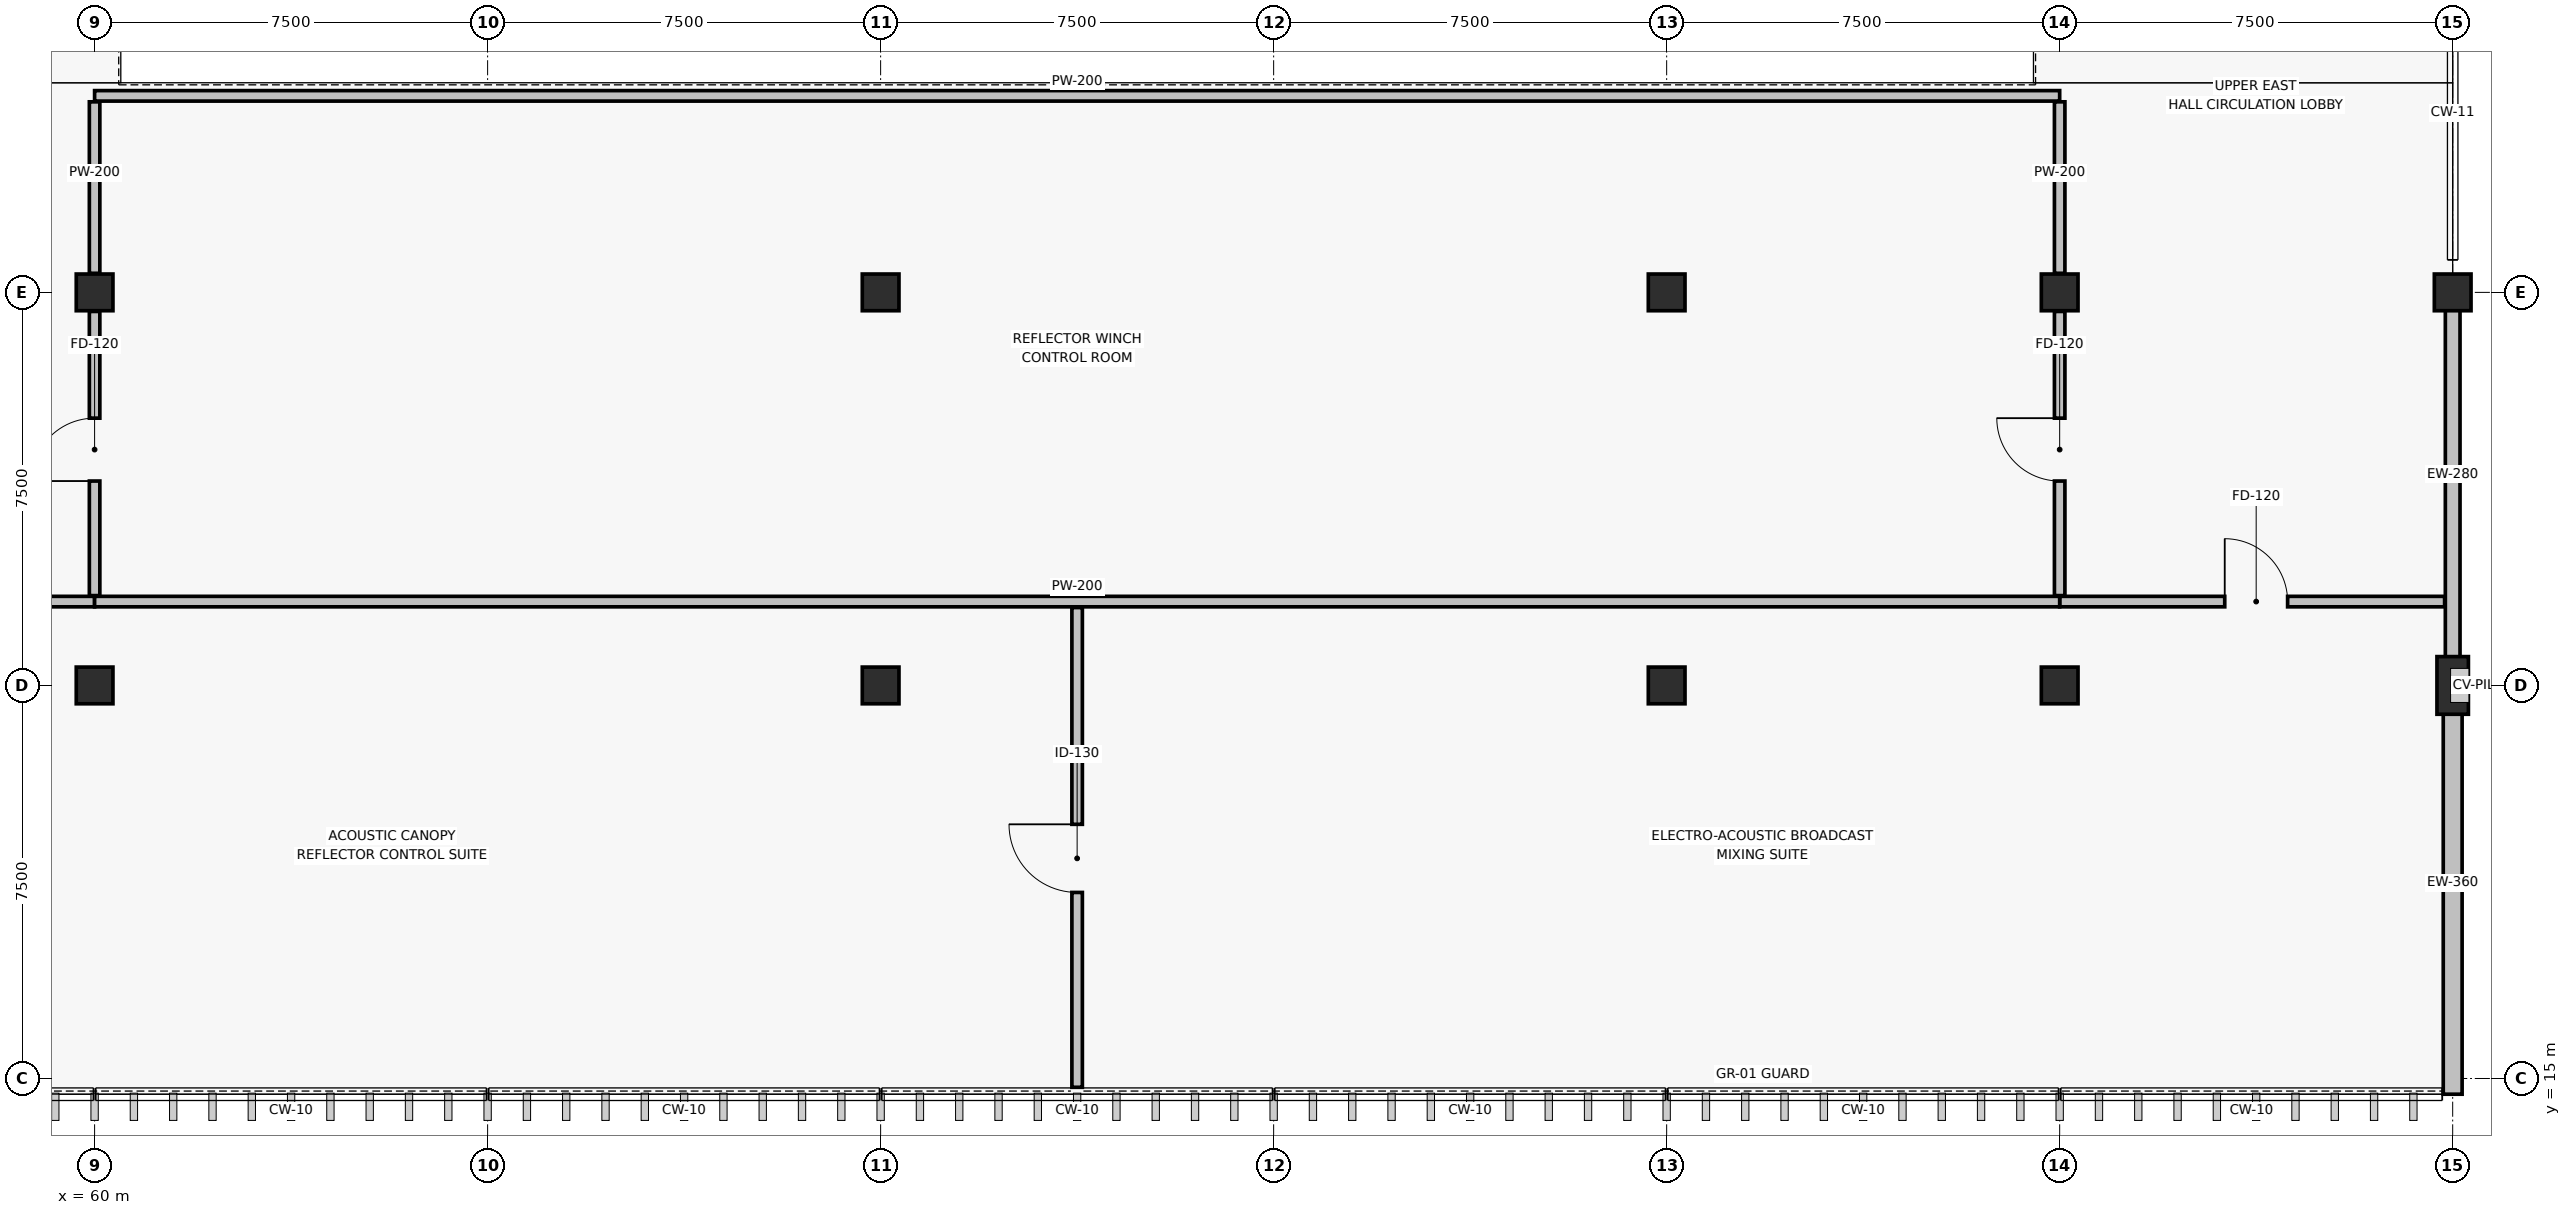
"""IFC4 building model, lengths in metres.
Left out: names, types, materials, properties, quantities, classifications, styles, units other than length and angle.
Written with IfcOpenShell. Run it as: python <this file> out.ifc"""

import sys

from ifc_helpers import new_model, si_unit, direction, frame, frame_2d, origin, origin_2d, place, context, subcontext, project, spatial, rectangle, extrude, element, fill, save


model = new_model("IFC4")
c1 = context("Model", 3, precision=1e-05, world=origin(), true_north=direction((0.0, 1.0)))
c2 = subcontext(c1, "Body", "Model", "MODEL_VIEW")
j1 = project(units=[si_unit("LENGTHUNIT", "METRE"), si_unit("PLANEANGLEUNIT", "RADIAN")], contexts=[c1])
p1 = place(None, origin())
s1 = spatial("IfcSite", under=j1, at=p1, CompositionType="ELEMENT")
p2 = place(p1, origin())
s2 = spatial("IfcBuilding", under=s1, at=p2, CompositionType="ELEMENT")
p3 = place(p2, frame((0.0, 0.0, 17.1)))
s3 = spatial("IfcBuildingStorey", under=s2, at=p3, CompositionType="ELEMENT", Elevation=17.1)
for number, where, z_axis, x_axis in (
    (1, (60.0, 22.5, 0.0), (0.0, 0.0, 1.0), (1.0, 0.0, 0.0)),
    (2, (60.0, 30.0, 0.0), (0.0, 0.0, 1.0), (1.0, 0.0, 0.0)),
    (3, (75.0, 22.5, 0.0), (0.0, 0.0, 1.0), (1.0, 0.0, 0.0)),
    (4, (75.0, 30.0, 0.0), (0.0, 0.0, 1.0), (1.0, 0.0, 0.0)),
    (5, (90.0, 22.5, 0.0), (0.0, 0.0, 1.0), (1.0, 0.0, 0.0)),
    (6, (90.0, 30.0, 0.0), (0.0, 0.0, 1.0), (1.0, 0.0, 0.0)),
    (7, (97.5, 22.5, 0.0), (0.0, 0.0, 1.0), (1.0, 0.0, 0.0)),
    (8, (97.5, 30.0, 0.0), (0.0, 0.0, 1.0), (1.0, 0.0, 0.0)),
):
    element("IfcColumn", number, at=place(p3, frame(where, z_axis=z_axis, x_axis=x_axis)), inside=s3, PredefinedType="COLUMN", context=c2, shape_type="SweptSolid", body=[
        extrude(rectangle(XDim=0.7, YDim=0.7, at=origin_2d()), origin(), (0.0, 0.0, 1.0), 3.9),
    ])
p4 = place(p3, frame((105.0, 22.5, 0.0), z_axis=(0.0, 0.0, 1.0), x_axis=(1.0, 0.0, 0.0)))
e9 = element("IfcColumn", 9, at=p4, inside=s3, PredefinedType="COLUMN", context=c2, shape_type="SweptSolid", body=[
    extrude(rectangle(XDim=0.6, YDim=1.1, at=origin_2d()), origin(), (0.0, 0.0, 1.0), 3.9),
])
p5 = place(p3, frame((105.0, 30.0, 0.0), z_axis=(0.0, 0.0, 1.0), x_axis=(1.0, 0.0, 0.0)))
e10 = element("IfcColumn", 10, at=p5, inside=s3, PredefinedType="COLUMN", context=c2, shape_type="SweptSolid", body=[
    extrude(rectangle(XDim=0.7, YDim=0.7, at=origin_2d()), origin(), (0.0, 0.0, 1.0), 3.9),
])
p6 = place(p3, frame((105.0, 14.7, 0.0), z_axis=(0.0, 0.0, 1.0), x_axis=(0.0, 1.0, 0.0)))
e11 = element("IfcWall", 11, at=p6, inside=s3, PredefinedType="SOLIDWALL", context=c2, shape_type="SweptSolid", body=[
    extrude(rectangle(XDim=7.5, YDim=0.36, at=frame_2d((3.75, 0.0))), origin(), (0.0, 0.0, 1.0), 2.39),
])
p7 = place(p3, frame((105.0, 22.8, 0.0), z_axis=(0.0, 0.0, 1.0), x_axis=(0.0, 1.0, 0.0)))
e12 = element("IfcWall", 12, at=p7, inside=s3, PredefinedType="SOLIDWALL", context=c2, shape_type="SweptSolid", body=[
    extrude(rectangle(XDim=6.9, YDim=0.28, at=frame_2d((3.45, 0.0))), origin(), (0.0, 0.0, 1.0), 2.39),
])
p8 = place(p3, frame((52.654, 24.1, 0.0), z_axis=(0.0, 0.0, 1.0), x_axis=(1.0, 0.0, 0.0)))
e13 = element("IfcWall", 13, at=p8, inside=s3, PredefinedType="PARTITIONING", context=c2, shape_type="SweptSolid", body=[
    extrude(rectangle(XDim=7.346, YDim=0.2, at=frame_2d((3.673, 0.0))), origin(), (0.0, 0.0, 1.0), 2.39),
])
p9 = place(p8, frame((2.996, 0.0, 0.0)))
e14 = element("IfcOpeningElement", 14, at=p9, cuts=e13, PredefinedType="OPENING", context=c2, shape_type="SweptSolid", body=[
    extrude(rectangle(XDim=1.2, YDim=2.15, at=frame_2d((0.6, 1.075))), frame((0.0, 0.11, 0.0), z_axis=(0.0, -1.0, 0.0), x_axis=(1.0, 0.0, 0.0)), (0.0, 0.0, 1.0), 0.22),
])
p10 = place(p3, frame((97.5, 24.1, 0.0), z_axis=(0.0, 0.0, 1.0), x_axis=(1.0, 0.0, 0.0)))
e15 = element("IfcWall", 15, at=p10, inside=s3, PredefinedType="PARTITIONING", context=c2, shape_type="SweptSolid", body=[
    extrude(rectangle(XDim=7.346, YDim=0.2, at=frame_2d((3.673, 0.0))), origin(), (0.0, 0.0, 1.0), 2.39),
])
p11 = place(p10, frame((3.15, 0.0, 0.0)))
e16 = element("IfcOpeningElement", 16, at=p11, cuts=e15, PredefinedType="OPENING", context=c2, shape_type="SweptSolid", body=[
    extrude(rectangle(XDim=1.2, YDim=2.15, at=frame_2d((0.6, 1.075))), frame((0.0, 0.11, 0.0), z_axis=(0.0, -1.0, 0.0), x_axis=(1.0, 0.0, 0.0)), (0.0, 0.0, 1.0), 0.22),
])
for number, where, z_axis, x_axis in (
    (17, (60.0, 24.1, 0.0), (0.0, 0.0, 1.0), (1.0, 0.0, 0.0)),
    (18, (60.0, 33.75, 0.0), (0.0, 0.0, 1.0), (1.0, 0.0, 0.0)),
):
    element("IfcWall", number, at=place(p3, frame(where, z_axis=z_axis, x_axis=x_axis)), inside=s3, PredefinedType="PARTITIONING", context=c2, shape_type="SweptSolid", body=[
        extrude(rectangle(XDim=37.5, YDim=0.2, at=frame_2d((18.75, 0.0))), origin(), (0.0, 0.0, 1.0), 2.39),
    ])
p12 = place(p3, frame((78.75, 14.832, 0.0), z_axis=(0.0, 0.0, 1.0), x_axis=(0.0, 1.0, 0.0)))
e19 = element("IfcWall", 19, at=p12, inside=s3, PredefinedType="PARTITIONING", context=c2, shape_type="SweptSolid", body=[
    extrude(rectangle(XDim=9.154, YDim=0.2, at=frame_2d((4.577, 0.0))), origin(), (0.0, 0.0, 1.0), 2.59),
])
p13 = place(p12, frame((3.718, 0.0, 0.0)))
e20 = element("IfcOpeningElement", 20, at=p13, cuts=e19, PredefinedType="OPENING", context=c2, shape_type="SweptSolid", body=[
    extrude(rectangle(XDim=1.3, YDim=2.15, at=frame_2d((0.65, 1.075))), frame((0.0, 0.11, 0.0), z_axis=(0.0, -1.0, 0.0), x_axis=(1.0, 0.0, 0.0)), (0.0, 0.0, 1.0), 0.22),
])
p14 = place(p3, frame((60.0, 24.214, 0.0), z_axis=(0.0, 0.0, 1.0), x_axis=(0.0, 1.0, 0.0)))
e21 = element("IfcWall", 21, at=p14, inside=s3, PredefinedType="PARTITIONING", context=c2, shape_type="SweptSolid", body=[
    extrude(rectangle(XDim=5.422, YDim=0.2, at=frame_2d((2.711, 0.0))), origin(), (0.0, 0.0, 1.0), 2.39),
])
p15 = place(p14, frame((2.186, 0.0, 0.0)))
e22 = element("IfcOpeningElement", 22, at=p15, cuts=e21, PredefinedType="OPENING", context=c2, shape_type="SweptSolid", body=[
    extrude(rectangle(XDim=1.2, YDim=2.15, at=frame_2d((0.6, 1.075))), frame((0.0, 0.11, 0.0), z_axis=(0.0, -1.0, 0.0), x_axis=(1.0, 0.0, 0.0)), (0.0, 0.0, 1.0), 0.22),
])
p16 = place(p3, frame((60.0, 30.364, 0.0), z_axis=(0.0, 0.0, 1.0), x_axis=(0.0, 1.0, 0.0)))
e23 = element("IfcWall", 23, at=p16, inside=s3, PredefinedType="PARTITIONING", context=c2, shape_type="SweptSolid", body=[
    extrude(rectangle(XDim=3.272, YDim=0.2, at=frame_2d((1.636, 0.0))), origin(), (0.0, 0.0, 1.0), 2.39),
])
p17 = place(p3, frame((97.5, 24.214, 0.0), z_axis=(0.0, 0.0, 1.0), x_axis=(0.0, 1.0, 0.0)))
e24 = element("IfcWall", 24, at=p17, inside=s3, PredefinedType="PARTITIONING", context=c2, shape_type="SweptSolid", body=[
    extrude(rectangle(XDim=5.422, YDim=0.2, at=frame_2d((2.711, 0.0))), origin(), (0.0, 0.0, 1.0), 2.39),
])
p18 = place(p17, frame((2.186, 0.0, 0.0)))
e25 = element("IfcOpeningElement", 25, at=p18, cuts=e24, PredefinedType="OPENING", context=c2, shape_type="SweptSolid", body=[
    extrude(rectangle(XDim=1.2, YDim=2.15, at=frame_2d((0.6, 1.075))), frame((0.0, 0.11, 0.0), z_axis=(0.0, -1.0, 0.0), x_axis=(1.0, 0.0, 0.0)), (0.0, 0.0, 1.0), 0.22),
])
p19 = place(p3, frame((97.5, 30.364, 0.0), z_axis=(0.0, 0.0, 1.0), x_axis=(0.0, 1.0, 0.0)))
e26 = element("IfcWall", 26, at=p19, inside=s3, PredefinedType="PARTITIONING", context=c2, shape_type="SweptSolid", body=[
    extrude(rectangle(XDim=3.272, YDim=0.2, at=frame_2d((1.636, 0.0))), origin(), (0.0, 0.0, 1.0), 2.39),
])
p20 = place(p11, origin())
e27 = element("IfcDoor", 27, at=p20, inside=s3, OperationType="SINGLE_SWING_LEFT", PredefinedType="DOOR", context=c2, shape_type="SweptSolid", body=[
    extrude(rectangle(XDim=1.2, YDim=2.15, at=frame_2d((0.6, 1.075))), frame((0.0, 0.025, 0.0), z_axis=(0.0, -1.0, 0.0), x_axis=(1.0, 0.0, 0.0)), (0.0, 0.0, 1.0), 0.05),
])
fill(e16, e27)
p21 = place(p13, origin())
e28 = element("IfcDoor", 28, at=p21, inside=s3, OperationType="SINGLE_SWING_RIGHT", PredefinedType="DOOR", context=c2, shape_type="SweptSolid", body=[
    extrude(rectangle(XDim=1.3, YDim=2.15, at=frame_2d((0.65, 1.075))), frame((0.0, 0.025, 0.0), z_axis=(0.0, -1.0, 0.0), x_axis=(1.0, 0.0, 0.0)), (0.0, 0.0, 1.0), 0.05),
])
fill(e20, e28)
p22 = place(p15, origin())
e29 = element("IfcDoor", 29, at=p22, inside=s3, OperationType="SINGLE_SWING_LEFT", PredefinedType="DOOR", context=c2, shape_type="SweptSolid", body=[
    extrude(rectangle(XDim=1.2, YDim=2.15, at=frame_2d((0.6, 1.075))), frame((0.0, 0.025, 0.0), z_axis=(0.0, -1.0, 0.0), x_axis=(1.0, 0.0, 0.0)), (0.0, 0.0, 1.0), 0.05),
])
fill(e22, e29)
p23 = place(p18, origin())
e30 = element("IfcDoor", 30, at=p23, inside=s3, OperationType="SINGLE_SWING_RIGHT", PredefinedType="DOOR", context=c2, shape_type="SweptSolid", body=[
    extrude(rectangle(XDim=1.2, YDim=2.15, at=frame_2d((0.6, 1.075))), frame((0.0, 0.025, 0.0), z_axis=(0.0, -1.0, 0.0), x_axis=(1.0, 0.0, 0.0)), (0.0, 0.0, 1.0), 0.05),
])
fill(e25, e30)
save(model, sys.argv[1])
